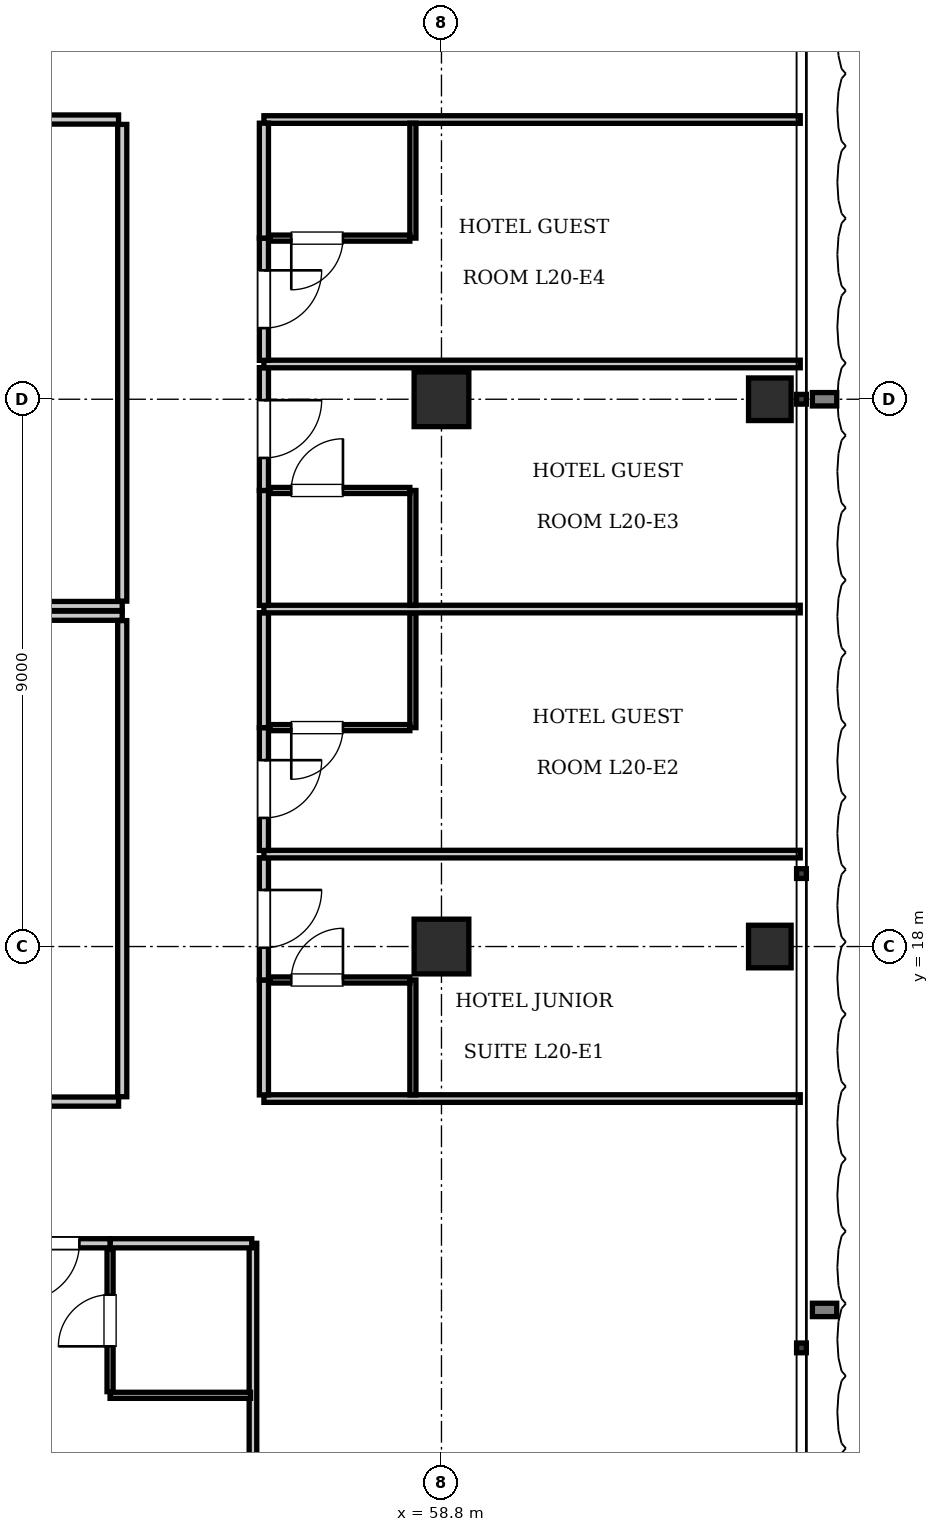
"""IFC4 building model, lengths in metres.
Left out: names, types, materials, properties, quantities, classifications, styles, units other than length and angle.
Written with IfcOpenShell. Run it as: python <this file> out.ifc"""

import sys

from ifc_helpers import new_model, si_unit, direction, frame, frame_2d, origin, origin_2d, place, context, subcontext, project, spatial, rectangle, i_section, extrude, element, fill, save


model = new_model("IFC4")
c1 = context("Model", 3, precision=1e-05, world=origin(), true_north=direction((0.0, 1.0)))
c2 = subcontext(c1, "Body", "Model", "MODEL_VIEW")
j1 = project(units=[si_unit("LENGTHUNIT", "METRE"), si_unit("PLANEANGLEUNIT", "RADIAN")], contexts=[c1])
p1 = place(None, origin())
s1 = spatial("IfcSite", under=j1, at=p1, CompositionType="ELEMENT")
p2 = place(p1, origin())
s2 = spatial("IfcBuilding", under=s1, at=p2, CompositionType="ELEMENT")
p3 = place(p2, frame((0.0, 0.0, 84.7)))
s3 = spatial("IfcBuildingStorey", under=s2, at=p3, CompositionType="ELEMENT", Elevation=84.7)
for number, where, z_axis, x_axis in (
    (1, (58.8, 18.0, 0.0), (0.0, 0.0, 1.0), (1.0, 0.0, 0.0)),
    (2, (58.8, 27.0, 0.0), (0.0, 0.0, 1.0), (1.0, 0.0, 0.0)),
):
    element("IfcColumn", number, at=place(p3, frame(where, z_axis=z_axis, x_axis=x_axis)), inside=s3, PredefinedType="COLUMN", context=c2, shape_type="SweptSolid", body=[
        extrude(rectangle(XDim=0.9, YDim=0.9, at=origin_2d()), origin(), (0.0, 0.0, 1.0), 3.85),
    ])
for number, where, z_axis, x_axis in (
    (3, (64.2, 18.0, 0.0), (0.0, 0.0, 1.0), (1.0, 0.0, 0.0)),
    (4, (64.2, 27.0, 0.0), (0.0, 0.0, 1.0), (1.0, 0.0, 0.0)),
):
    element("IfcColumn", number, at=place(p3, frame(where, z_axis=z_axis, x_axis=x_axis)), inside=s3, PredefinedType="COLUMN", context=c2, shape_type="SweptSolid", body=[
        extrude(i_section(OverallWidth=0.7, OverallDepth=0.7, WebThickness=0.028, FlangeThickness=0.044, at=origin_2d()), origin(), (0.0, 0.0, 1.0), 3.85),
    ])
p4 = place(p3, frame((22.05, 23.6, 0.0), z_axis=(0.0, 0.0, 1.0), x_axis=(1.0, 0.0, 0.0)))
e5 = element("IfcWall", 5, at=p4, inside=s3, PredefinedType="PARTITIONING", context=c2, shape_type="SweptSolid", body=[
    extrude(rectangle(XDim=31.5, YDim=0.15, at=frame_2d((15.75, 0.0))), origin(), (0.0, 0.0, 1.0), 3.61),
])
p5 = place(p3, frame((53.55, 23.68, 0.0), z_axis=(0.0, 0.0, 1.0), x_axis=(0.0, 1.0, 0.0)))
e6 = element("IfcWall", 6, at=p5, inside=s3, PredefinedType="PARTITIONING", context=c2, shape_type="SweptSolid", body=[
    extrude(rectangle(XDim=7.84, YDim=0.15, at=frame_2d((3.92, 0.0))), origin(), (0.0, 0.0, 1.0), 3.61),
])
p6 = place(p3, frame((42.87, 31.6, 0.0), z_axis=(0.0, 0.0, 1.0), x_axis=(1.0, 0.0, 0.0)))
e7 = element("IfcWall", 7, at=p6, inside=s3, PredefinedType="PARTITIONING", context=c2, shape_type="SweptSolid", body=[
    extrude(rectangle(XDim=10.62, YDim=0.15, at=frame_2d((5.31, 0.0))), origin(), (0.0, 0.0, 1.0), 3.61),
])
p7 = place(p6, frame((4.86, 0.0, 0.0)))
e8 = element("IfcOpeningElement", 8, at=p7, cuts=e7, PredefinedType="OPENING", context=c2, shape_type="SweptSolid", body=[
    extrude(rectangle(XDim=0.9, YDim=2.1, at=frame_2d((0.45, 1.05))), frame((0.0, 0.085, 0.0), z_axis=(0.0, -1.0, 0.0), x_axis=(1.0, 0.0, 0.0)), (0.0, 0.0, 1.0), 0.17),
])
p8 = place(p3, frame((22.05, 23.44, 0.0), z_axis=(0.0, 0.0, 1.0), x_axis=(1.0, 0.0, 0.0)))
e9 = element("IfcWall", 9, at=p8, inside=s3, PredefinedType="PARTITIONING", context=c2, shape_type="SweptSolid", body=[
    extrude(rectangle(XDim=31.5, YDim=0.15, at=frame_2d((15.75, 0.0))), origin(), (0.0, 0.0, 1.0), 3.61),
])
p9 = place(p3, frame((53.55, 15.53, 0.0), z_axis=(0.0, 0.0, 1.0), x_axis=(0.0, 1.0, 0.0)))
e10 = element("IfcWall", 10, at=p9, inside=s3, PredefinedType="PARTITIONING", context=c2, shape_type="SweptSolid", body=[
    extrude(rectangle(XDim=7.83, YDim=0.15, at=frame_2d((3.915, 0.0))), origin(), (0.0, 0.0, 1.0), 3.61),
])
p10 = place(p3, frame((40.035, 15.45, 0.0), z_axis=(0.0, 0.0, 1.0), x_axis=(1.0, 0.0, 0.0)))
e11 = element("IfcWall", 11, at=p10, inside=s3, PredefinedType="PARTITIONING", context=c2, shape_type="SweptSolid", body=[
    extrude(rectangle(XDim=13.455, YDim=0.15, at=frame_2d((6.728, 0.0))), origin(), (0.0, 0.0, 1.0), 3.61),
])
p11 = place(p10, frame((6.278, 0.0, 0.0)))
e12 = element("IfcOpeningElement", 12, at=p11, cuts=e11, PredefinedType="OPENING", context=c2, shape_type="SweptSolid", body=[
    extrude(rectangle(XDim=0.9, YDim=2.1, at=frame_2d((0.45, 1.05))), frame((0.0, 0.085, 0.0), z_axis=(0.0, -1.0, 0.0), x_axis=(1.0, 0.0, 0.0)), (0.0, 0.0, 1.0), 0.17),
])
p12 = place(p3, frame((55.7, 0.1, 0.0), z_axis=(0.0, 0.0, 1.0), x_axis=(0.0, 1.0, 0.0)))
e13 = element("IfcWall", 13, at=p12, inside=s3, PredefinedType="PARTITIONING", context=c2, shape_type="SweptSolid", body=[
    extrude(rectangle(XDim=13.02, YDim=0.125, at=frame_2d((6.51, 0.0))), origin(), (0.0, 0.0, 1.0), 3.61),
])
p13 = place(p3, frame((53.35, 13.12, 0.0), z_axis=(0.0, 0.0, 1.0), x_axis=(1.0, 0.0, 0.0)))
e14 = element("IfcWall", 14, at=p13, inside=s3, PredefinedType="PARTITIONING", context=c2, shape_type="SweptSolid", body=[
    extrude(rectangle(XDim=2.33, YDim=0.15, at=frame_2d((1.165, 0.0))), origin(), (0.0, 0.0, 1.0), 3.61),
])
p14 = place(p3, frame((53.35, 10.62, 0.0), z_axis=(0.0, 0.0, 1.0), x_axis=(1.0, 0.0, 0.0)))
e15 = element("IfcWall", 15, at=p14, inside=s3, PredefinedType="PARTITIONING", context=c2, shape_type="SweptSolid", body=[
    extrude(rectangle(XDim=2.31, YDim=0.1, at=frame_2d((1.155, 0.0))), origin(), (0.0, 0.0, 1.0), 3.61),
])
p15 = place(p3, frame((53.35, 10.68, 0.0), z_axis=(0.0, 0.0, 1.0), x_axis=(0.0, 1.0, 0.0)))
e16 = element("IfcWall", 16, at=p15, inside=s3, PredefinedType="PARTITIONING", context=c2, shape_type="SweptSolid", body=[
    extrude(rectangle(XDim=2.34, YDim=0.1, at=frame_2d((1.17, 0.0))), origin(), (0.0, 0.0, 1.0), 3.61),
])
p16 = place(p15, frame((0.745, 0.0, 0.0)))
e17 = element("IfcOpeningElement", 17, at=p16, cuts=e16, PredefinedType="OPENING", context=c2, shape_type="SweptSolid", body=[
    extrude(rectangle(XDim=0.85, YDim=2.1, at=frame_2d((0.425, 1.05))), frame((0.0, 0.06, 0.0), z_axis=(0.0, -1.0, 0.0), x_axis=(1.0, 0.0, 0.0)), (0.0, 0.0, 1.0), 0.12),
])
p17 = place(p3, frame((51.39, 13.12, 0.0), z_axis=(0.0, 0.0, 1.0), x_axis=(1.0, 0.0, 0.0)))
e18 = element("IfcWall", 18, at=p17, inside=s3, PredefinedType="PARTITIONING", context=c2, shape_type="SweptSolid", body=[
    extrude(rectangle(XDim=1.96, YDim=0.15, at=frame_2d((0.98, 0.0))), origin(), (0.0, 0.0, 1.0), 3.61),
])
p18 = place(p17, frame((0.505, 0.0, 0.0)))
e19 = element("IfcOpeningElement", 19, at=p18, cuts=e18, PredefinedType="OPENING", context=c2, shape_type="SweptSolid", body=[
    extrude(rectangle(XDim=0.95, YDim=2.15, at=frame_2d((0.475, 1.075))), frame((0.0, 0.085, 0.0), z_axis=(0.0, -1.0, 0.0), x_axis=(1.0, 0.0, 0.0)), (0.0, 0.0, 1.0), 0.17),
])
for number, where, z_axis, x_axis in (
    (20, (55.88, 15.5, 0.0), (0.0, 0.0, 1.0), (1.0, 0.0, 0.0)),
    (21, (55.88, 31.6, 0.0), (0.0, 0.0, 1.0), (1.0, 0.0, 0.0)),
):
    element("IfcWall", number, at=place(p3, frame(where, z_axis=z_axis, x_axis=x_axis)), inside=s3, PredefinedType="PARTITIONING", context=c2, shape_type="SweptSolid", body=[
        extrude(rectangle(XDim=8.82, YDim=0.125, at=frame_2d((4.41, 0.0))), origin(), (0.0, 0.0, 1.0), 3.61),
    ])
p19 = place(p3, frame((55.88, 15.56, 0.0), z_axis=(0.0, 0.0, 1.0), x_axis=(0.0, 1.0, 0.0)))
e22 = element("IfcWall", 22, at=p19, inside=s3, PredefinedType="PARTITIONING", context=c2, shape_type="SweptSolid", body=[
    extrude(rectangle(XDim=1.89, YDim=0.15, at=frame_2d((0.945, 0.0))), origin(), (0.0, 0.0, 1.0), 3.61),
])
p20 = place(p3, frame((55.88, 17.45, 0.0), z_axis=(0.0, 0.0, 1.0), x_axis=(0.0, 1.0, 0.0)))
e23 = element("IfcWall", 23, at=p20, inside=s3, PredefinedType="PARTITIONING", context=c2, shape_type="SweptSolid", body=[
    extrude(rectangle(XDim=2.01, YDim=0.15, at=frame_2d((1.005, 0.0))), origin(), (0.0, 0.0, 1.0), 3.61),
])
p21 = place(p20, frame((0.53, 0.0, 0.0)))
e24 = element("IfcOpeningElement", 24, at=p21, cuts=e23, PredefinedType="OPENING", context=c2, shape_type="SweptSolid", body=[
    extrude(rectangle(XDim=0.95, YDim=2.15, at=frame_2d((0.475, 1.075))), frame((0.0, 0.085, 0.0), z_axis=(0.0, -1.0, 0.0), x_axis=(1.0, 0.0, 0.0)), (0.0, 0.0, 1.0), 0.17),
])
p22 = place(p3, frame((58.33, 15.56, 0.0), z_axis=(0.0, 0.0, 1.0), x_axis=(0.0, 1.0, 0.0)))
e25 = element("IfcWall", 25, at=p22, inside=s3, PredefinedType="PARTITIONING", context=c2, shape_type="SweptSolid", body=[
    extrude(rectangle(XDim=1.89, YDim=0.1, at=frame_2d((0.945, 0.0))), origin(), (0.0, 0.0, 1.0), 3.61),
])
p23 = place(p3, frame((55.98, 17.45, 0.0), z_axis=(0.0, 0.0, 1.0), x_axis=(1.0, 0.0, 0.0)))
e26 = element("IfcWall", 26, at=p23, inside=s3, PredefinedType="PARTITIONING", context=c2, shape_type="SweptSolid", body=[
    extrude(rectangle(XDim=2.3, YDim=0.1, at=frame_2d((1.15, 0.0))), origin(), (0.0, 0.0, 1.0), 3.61),
])
p24 = place(p23, frame((0.35, 0.0, 0.0)))
e27 = element("IfcOpeningElement", 27, at=p24, cuts=e26, PredefinedType="OPENING", context=c2, shape_type="SweptSolid", body=[
    extrude(rectangle(XDim=0.85, YDim=2.1, at=frame_2d((0.425, 1.05))), frame((0.0, 0.06, 0.0), z_axis=(0.0, -1.0, 0.0), x_axis=(1.0, 0.0, 0.0)), (0.0, 0.0, 1.0), 0.12),
])
p25 = place(p3, frame((55.88, 19.52, 0.0), z_axis=(0.0, 0.0, 1.0), x_axis=(1.0, 0.0, 0.0)))
e28 = element("IfcWall", 28, at=p25, inside=s3, PredefinedType="PARTITIONING", context=c2, shape_type="SweptSolid", body=[
    extrude(rectangle(XDim=8.82, YDim=0.125, at=frame_2d((4.41, 0.0))), origin(), (0.0, 0.0, 1.0), 3.61),
])
p26 = place(p3, frame((55.88, 19.58, 0.0), z_axis=(0.0, 0.0, 1.0), x_axis=(0.0, 1.0, 0.0)))
e29 = element("IfcWall", 29, at=p26, inside=s3, PredefinedType="PARTITIONING", context=c2, shape_type="SweptSolid", body=[
    extrude(rectangle(XDim=2.02, YDim=0.15, at=frame_2d((1.01, 0.0))), origin(), (0.0, 0.0, 1.0), 3.61),
])
p27 = place(p26, frame((0.535, 0.0, 0.0)))
e30 = element("IfcOpeningElement", 30, at=p27, cuts=e29, PredefinedType="OPENING", context=c2, shape_type="SweptSolid", body=[
    extrude(rectangle(XDim=0.95, YDim=2.15, at=frame_2d((0.475, 1.075))), frame((0.0, 0.085, 0.0), z_axis=(0.0, -1.0, 0.0), x_axis=(1.0, 0.0, 0.0)), (0.0, 0.0, 1.0), 0.17),
])
p28 = place(p3, frame((55.88, 21.6, 0.0), z_axis=(0.0, 0.0, 1.0), x_axis=(0.0, 1.0, 0.0)))
e31 = element("IfcWall", 31, at=p28, inside=s3, PredefinedType="PARTITIONING", context=c2, shape_type="SweptSolid", body=[
    extrude(rectangle(XDim=1.89, YDim=0.15, at=frame_2d((0.945, 0.0))), origin(), (0.0, 0.0, 1.0), 3.61),
])
p29 = place(p3, frame((58.33, 21.6, 0.0), z_axis=(0.0, 0.0, 1.0), x_axis=(0.0, 1.0, 0.0)))
e32 = element("IfcWall", 32, at=p29, inside=s3, PredefinedType="PARTITIONING", context=c2, shape_type="SweptSolid", body=[
    extrude(rectangle(XDim=1.89, YDim=0.1, at=frame_2d((0.945, 0.0))), origin(), (0.0, 0.0, 1.0), 3.61),
])
p30 = place(p3, frame((55.98, 21.6, 0.0), z_axis=(0.0, 0.0, 1.0), x_axis=(1.0, 0.0, 0.0)))
e33 = element("IfcWall", 33, at=p30, inside=s3, PredefinedType="PARTITIONING", context=c2, shape_type="SweptSolid", body=[
    extrude(rectangle(XDim=2.3, YDim=0.1, at=frame_2d((1.15, 0.0))), origin(), (0.0, 0.0, 1.0), 3.61),
])
p31 = place(p30, frame((0.35, 0.0, 0.0)))
e34 = element("IfcOpeningElement", 34, at=p31, cuts=e33, PredefinedType="OPENING", context=c2, shape_type="SweptSolid", body=[
    extrude(rectangle(XDim=0.85, YDim=2.1, at=frame_2d((0.425, 1.05))), frame((0.0, 0.06, 0.0), z_axis=(0.0, -1.0, 0.0), x_axis=(1.0, 0.0, 0.0)), (0.0, 0.0, 1.0), 0.12),
])
p32 = place(p3, frame((55.88, 23.55, 0.0), z_axis=(0.0, 0.0, 1.0), x_axis=(1.0, 0.0, 0.0)))
e35 = element("IfcWall", 35, at=p32, inside=s3, PredefinedType="PARTITIONING", context=c2, shape_type="SweptSolid", body=[
    extrude(rectangle(XDim=8.82, YDim=0.125, at=frame_2d((4.41, 0.0))), origin(), (0.0, 0.0, 1.0), 3.61),
])
p33 = place(p3, frame((55.88, 23.61, 0.0), z_axis=(0.0, 0.0, 1.0), x_axis=(0.0, 1.0, 0.0)))
e36 = element("IfcWall", 36, at=p33, inside=s3, PredefinedType="PARTITIONING", context=c2, shape_type="SweptSolid", body=[
    extrude(rectangle(XDim=1.89, YDim=0.15, at=frame_2d((0.945, 0.0))), origin(), (0.0, 0.0, 1.0), 3.61),
])
p34 = place(p3, frame((55.88, 25.5, 0.0), z_axis=(0.0, 0.0, 1.0), x_axis=(0.0, 1.0, 0.0)))
e37 = element("IfcWall", 37, at=p34, inside=s3, PredefinedType="PARTITIONING", context=c2, shape_type="SweptSolid", body=[
    extrude(rectangle(XDim=2.02, YDim=0.15, at=frame_2d((1.01, 0.0))), origin(), (0.0, 0.0, 1.0), 3.61),
])
p35 = place(p34, frame((0.535, 0.0, 0.0)))
e38 = element("IfcOpeningElement", 38, at=p35, cuts=e37, PredefinedType="OPENING", context=c2, shape_type="SweptSolid", body=[
    extrude(rectangle(XDim=0.95, YDim=2.15, at=frame_2d((0.475, 1.075))), frame((0.0, 0.085, 0.0), z_axis=(0.0, -1.0, 0.0), x_axis=(1.0, 0.0, 0.0)), (0.0, 0.0, 1.0), 0.17),
])
p36 = place(p3, frame((58.33, 23.61, 0.0), z_axis=(0.0, 0.0, 1.0), x_axis=(0.0, 1.0, 0.0)))
e39 = element("IfcWall", 39, at=p36, inside=s3, PredefinedType="PARTITIONING", context=c2, shape_type="SweptSolid", body=[
    extrude(rectangle(XDim=1.89, YDim=0.1, at=frame_2d((0.945, 0.0))), origin(), (0.0, 0.0, 1.0), 3.61),
])
p37 = place(p3, frame((55.98, 25.5, 0.0), z_axis=(0.0, 0.0, 1.0), x_axis=(1.0, 0.0, 0.0)))
e40 = element("IfcWall", 40, at=p37, inside=s3, PredefinedType="PARTITIONING", context=c2, shape_type="SweptSolid", body=[
    extrude(rectangle(XDim=2.3, YDim=0.1, at=frame_2d((1.15, 0.0))), origin(), (0.0, 0.0, 1.0), 3.61),
])
p38 = place(p37, frame((0.35, 0.0, 0.0)))
e41 = element("IfcOpeningElement", 41, at=p38, cuts=e40, PredefinedType="OPENING", context=c2, shape_type="SweptSolid", body=[
    extrude(rectangle(XDim=0.85, YDim=2.1, at=frame_2d((0.425, 1.05))), frame((0.0, 0.06, 0.0), z_axis=(0.0, -1.0, 0.0), x_axis=(1.0, 0.0, 0.0)), (0.0, 0.0, 1.0), 0.12),
])
p39 = place(p3, frame((55.88, 27.58, 0.0), z_axis=(0.0, 0.0, 1.0), x_axis=(1.0, 0.0, 0.0)))
e42 = element("IfcWall", 42, at=p39, inside=s3, PredefinedType="PARTITIONING", context=c2, shape_type="SweptSolid", body=[
    extrude(rectangle(XDim=8.82, YDim=0.125, at=frame_2d((4.41, 0.0))), origin(), (0.0, 0.0, 1.0), 3.61),
])
p40 = place(p3, frame((55.88, 27.64, 0.0), z_axis=(0.0, 0.0, 1.0), x_axis=(0.0, 1.0, 0.0)))
e43 = element("IfcWall", 43, at=p40, inside=s3, PredefinedType="PARTITIONING", context=c2, shape_type="SweptSolid", body=[
    extrude(rectangle(XDim=2.01, YDim=0.15, at=frame_2d((1.005, 0.0))), origin(), (0.0, 0.0, 1.0), 3.61),
])
p41 = place(p40, frame((0.53, 0.0, 0.0)))
e44 = element("IfcOpeningElement", 44, at=p41, cuts=e43, PredefinedType="OPENING", context=c2, shape_type="SweptSolid", body=[
    extrude(rectangle(XDim=0.95, YDim=2.15, at=frame_2d((0.475, 1.075))), frame((0.0, 0.085, 0.0), z_axis=(0.0, -1.0, 0.0), x_axis=(1.0, 0.0, 0.0)), (0.0, 0.0, 1.0), 0.17),
])
p42 = place(p3, frame((55.88, 29.65, 0.0), z_axis=(0.0, 0.0, 1.0), x_axis=(0.0, 1.0, 0.0)))
e45 = element("IfcWall", 45, at=p42, inside=s3, PredefinedType="PARTITIONING", context=c2, shape_type="SweptSolid", body=[
    extrude(rectangle(XDim=1.89, YDim=0.15, at=frame_2d((0.945, 0.0))), origin(), (0.0, 0.0, 1.0), 3.61),
])
p43 = place(p3, frame((58.33, 29.65, 0.0), z_axis=(0.0, 0.0, 1.0), x_axis=(0.0, 1.0, 0.0)))
e46 = element("IfcWall", 46, at=p43, inside=s3, PredefinedType="PARTITIONING", context=c2, shape_type="SweptSolid", body=[
    extrude(rectangle(XDim=1.89, YDim=0.1, at=frame_2d((0.945, 0.0))), origin(), (0.0, 0.0, 1.0), 3.61),
])
p44 = place(p3, frame((55.98, 29.65, 0.0), z_axis=(0.0, 0.0, 1.0), x_axis=(1.0, 0.0, 0.0)))
e47 = element("IfcWall", 47, at=p44, inside=s3, PredefinedType="PARTITIONING", context=c2, shape_type="SweptSolid", body=[
    extrude(rectangle(XDim=2.3, YDim=0.1, at=frame_2d((1.15, 0.0))), origin(), (0.0, 0.0, 1.0), 3.61),
])
p45 = place(p44, frame((0.35, 0.0, 0.0)))
e48 = element("IfcOpeningElement", 48, at=p45, cuts=e47, PredefinedType="OPENING", context=c2, shape_type="SweptSolid", body=[
    extrude(rectangle(XDim=0.85, YDim=2.1, at=frame_2d((0.425, 1.05))), frame((0.0, 0.06, 0.0), z_axis=(0.0, -1.0, 0.0), x_axis=(1.0, 0.0, 0.0)), (0.0, 0.0, 1.0), 0.12),
])
p46 = place(p16, origin())
e49 = element("IfcDoor", 49, at=p46, inside=s3, OperationType="SINGLE_SWING_LEFT", PredefinedType="DOOR", context=c2, shape_type="SweptSolid", body=[
    extrude(rectangle(XDim=0.85, YDim=2.1, at=frame_2d((0.425, 1.05))), frame((0.0, 0.025, 0.0), z_axis=(0.0, -1.0, 0.0), x_axis=(1.0, 0.0, 0.0)), (0.0, 0.0, 1.0), 0.05),
])
fill(e17, e49)
p47 = place(p18, frame((0.95, 0.0, 0.0), z_axis=(0.0, 0.0, 1.0), x_axis=(-1.0, 0.0, 0.0)))
e50 = element("IfcDoor", 50, at=p47, inside=s3, OperationType="SINGLE_SWING_RIGHT", PredefinedType="DOOR", context=c2, shape_type="SweptSolid", body=[
    extrude(rectangle(XDim=0.95, YDim=2.15, at=frame_2d((0.475, 1.075))), frame((0.0, 0.025, 0.0), z_axis=(0.0, -1.0, 0.0), x_axis=(1.0, 0.0, 0.0)), (0.0, 0.0, 1.0), 0.05),
])
fill(e19, e50)
p48 = place(p24, origin())
e51 = element("IfcDoor", 51, at=p48, inside=s3, OperationType="SINGLE_SWING_RIGHT", PredefinedType="DOOR", context=c2, shape_type="SweptSolid", body=[
    extrude(rectangle(XDim=0.85, YDim=2.1, at=frame_2d((0.425, 1.05))), frame((0.0, 0.025, 0.0), z_axis=(0.0, -1.0, 0.0), x_axis=(1.0, 0.0, 0.0)), (0.0, 0.0, 1.0), 0.05),
])
fill(e27, e51)
p49 = place(p21, frame((0.95, 0.0, 0.0), z_axis=(0.0, 0.0, 1.0), x_axis=(-1.0, 0.0, 0.0)))
e52 = element("IfcDoor", 52, at=p49, inside=s3, OperationType="SINGLE_SWING_LEFT", PredefinedType="DOOR", context=c2, shape_type="SweptSolid", body=[
    extrude(rectangle(XDim=0.95, YDim=2.15, at=frame_2d((0.475, 1.075))), frame((0.0, 0.025, 0.0), z_axis=(0.0, -1.0, 0.0), x_axis=(1.0, 0.0, 0.0)), (0.0, 0.0, 1.0), 0.05),
])
fill(e24, e52)
p50 = place(p31, frame((0.85, 0.0, 0.0), z_axis=(0.0, 0.0, 1.0), x_axis=(-1.0, 0.0, 0.0)))
e53 = element("IfcDoor", 53, at=p50, inside=s3, OperationType="SINGLE_SWING_RIGHT", PredefinedType="DOOR", context=c2, shape_type="SweptSolid", body=[
    extrude(rectangle(XDim=0.85, YDim=2.1, at=frame_2d((0.425, 1.05))), frame((0.0, 0.025, 0.0), z_axis=(0.0, -1.0, 0.0), x_axis=(1.0, 0.0, 0.0)), (0.0, 0.0, 1.0), 0.05),
])
fill(e34, e53)
p51 = place(p27, frame((0.95, 0.0, 0.0), z_axis=(0.0, 0.0, 1.0), x_axis=(-1.0, 0.0, 0.0)))
e54 = element("IfcDoor", 54, at=p51, inside=s3, OperationType="SINGLE_SWING_LEFT", PredefinedType="DOOR", context=c2, shape_type="SweptSolid", body=[
    extrude(rectangle(XDim=0.95, YDim=2.15, at=frame_2d((0.475, 1.075))), frame((0.0, 0.025, 0.0), z_axis=(0.0, -1.0, 0.0), x_axis=(1.0, 0.0, 0.0)), (0.0, 0.0, 1.0), 0.05),
])
fill(e30, e54)
p52 = place(p38, origin())
e55 = element("IfcDoor", 55, at=p52, inside=s3, OperationType="SINGLE_SWING_RIGHT", PredefinedType="DOOR", context=c2, shape_type="SweptSolid", body=[
    extrude(rectangle(XDim=0.85, YDim=2.1, at=frame_2d((0.425, 1.05))), frame((0.0, 0.025, 0.0), z_axis=(0.0, -1.0, 0.0), x_axis=(1.0, 0.0, 0.0)), (0.0, 0.0, 1.0), 0.05),
])
fill(e41, e55)
p53 = place(p35, frame((0.95, 0.0, 0.0), z_axis=(0.0, 0.0, 1.0), x_axis=(-1.0, 0.0, 0.0)))
e56 = element("IfcDoor", 56, at=p53, inside=s3, OperationType="SINGLE_SWING_LEFT", PredefinedType="DOOR", context=c2, shape_type="SweptSolid", body=[
    extrude(rectangle(XDim=0.95, YDim=2.15, at=frame_2d((0.475, 1.075))), frame((0.0, 0.025, 0.0), z_axis=(0.0, -1.0, 0.0), x_axis=(1.0, 0.0, 0.0)), (0.0, 0.0, 1.0), 0.05),
])
fill(e38, e56)
p54 = place(p45, frame((0.85, 0.0, 0.0), z_axis=(0.0, 0.0, 1.0), x_axis=(-1.0, 0.0, 0.0)))
e57 = element("IfcDoor", 57, at=p54, inside=s3, OperationType="SINGLE_SWING_RIGHT", PredefinedType="DOOR", context=c2, shape_type="SweptSolid", body=[
    extrude(rectangle(XDim=0.85, YDim=2.1, at=frame_2d((0.425, 1.05))), frame((0.0, 0.025, 0.0), z_axis=(0.0, -1.0, 0.0), x_axis=(1.0, 0.0, 0.0)), (0.0, 0.0, 1.0), 0.05),
])
fill(e48, e57)
p55 = place(p41, frame((0.95, 0.0, 0.0), z_axis=(0.0, 0.0, 1.0), x_axis=(-1.0, 0.0, 0.0)))
e58 = element("IfcDoor", 58, at=p55, inside=s3, OperationType="SINGLE_SWING_LEFT", PredefinedType="DOOR", context=c2, shape_type="SweptSolid", body=[
    extrude(rectangle(XDim=0.95, YDim=2.15, at=frame_2d((0.475, 1.075))), frame((0.0, 0.025, 0.0), z_axis=(0.0, -1.0, 0.0), x_axis=(1.0, 0.0, 0.0)), (0.0, 0.0, 1.0), 0.05),
])
fill(e44, e58)
save(model, sys.argv[1])
